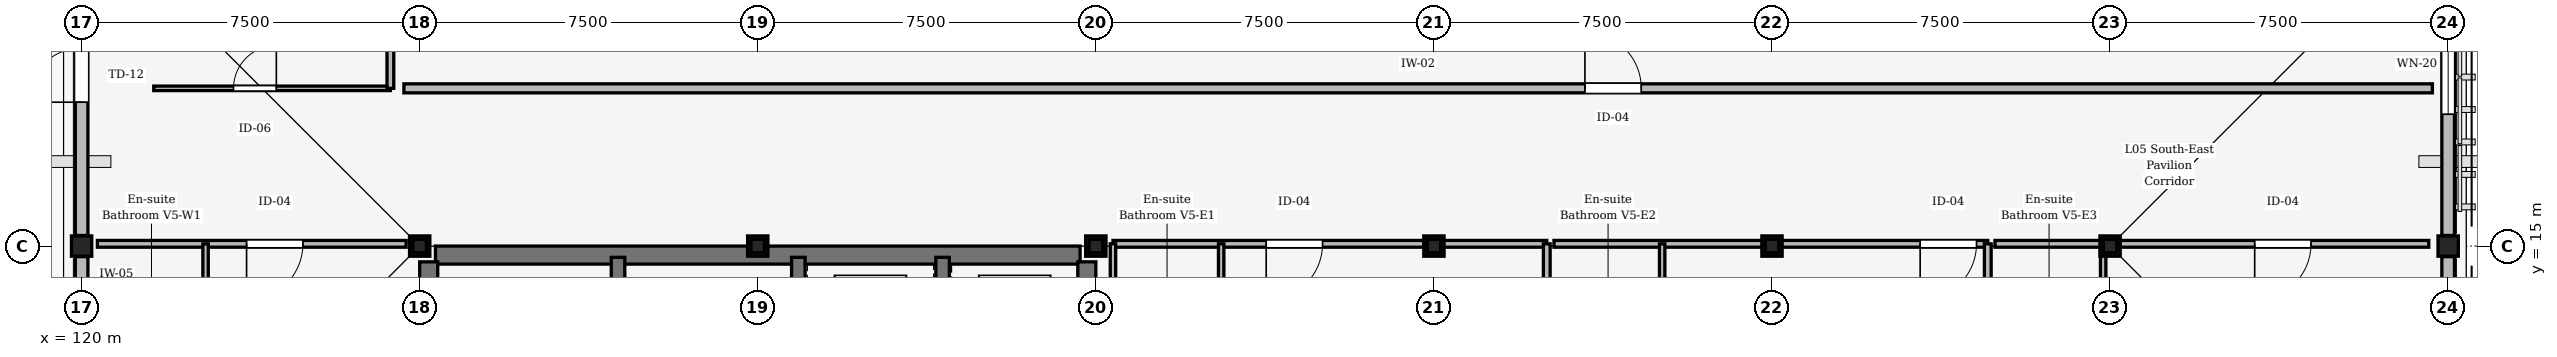
"""IFC4 building model, lengths in metres.
Left out: names, types, materials, properties, quantities, classifications, styles, units other than length and angle.
Written with IfcOpenShell. Run it as: python <this file> out.ifc"""

import sys

from ifc_helpers import new_model, si_unit, direction, frame, frame_2d, origin, origin_2d, place, context, subcontext, project, spatial, rectangle, i_section, extrude, element, fill, save


model = new_model("IFC4")
c1 = context("Model", 3, precision=1e-05, world=origin(), true_north=direction((0.0, 1.0)))
c2 = subcontext(c1, "Body", "Model", "MODEL_VIEW")
j1 = project(units=[si_unit("LENGTHUNIT", "METRE"), si_unit("PLANEANGLEUNIT", "RADIAN")], contexts=[c1])
p1 = place(None, origin())
s1 = spatial("IfcSite", under=j1, at=p1, CompositionType="ELEMENT")
p2 = place(p1, origin())
s2 = spatial("IfcBuilding", under=s1, at=p2, CompositionType="ELEMENT")
p3 = place(p2, frame((0.0, 0.0, 21.9)))
s3 = spatial("IfcBuildingStorey", under=s2, at=p3, CompositionType="ELEMENT", Elevation=21.9)
for number, where, z_axis, x_axis in (
    (1, (120.0, 15.0, 0.0), (0.0, 0.0, 1.0), (1.0, 0.0, 0.0)),
    (2, (127.5, 15.0, 0.0), (0.0, 0.0, 1.0), (1.0, 0.0, 0.0)),
    (3, (135.0, 15.0, 0.0), (0.0, 0.0, 1.0), (1.0, 0.0, 0.0)),
    (4, (142.5, 15.0, 0.0), (0.0, 0.0, 1.0), (1.0, 0.0, 0.0)),
    (5, (150.0, 15.0, 0.0), (0.0, 0.0, 1.0), (1.0, 0.0, 0.0)),
    (6, (157.5, 15.0, 0.0), (0.0, 0.0, 1.0), (1.0, 0.0, 0.0)),
    (7, (165.0, 15.0, 0.0), (0.0, 0.0, 1.0), (1.0, 0.0, 0.0)),
    (8, (172.5, 15.0, 0.0), (0.0, 0.0, 1.0), (1.0, 0.0, 0.0)),
):
    element("IfcColumn", number, at=place(p3, frame(where, z_axis=z_axis, x_axis=x_axis)), inside=s3, PredefinedType="COLUMN", context=c2, shape_type="SweptSolid", body=[
        extrude(rectangle(XDim=0.45, YDim=0.45, at=origin_2d()), origin(), (0.0, 0.0, 1.0), 4.05),
    ])
for number, where, z_axis, x_axis in (
    (9, (127.5, 15.0, 4.05), (0.0, 0.0, 1.0), (1.0, 0.0, 0.0)),
    (10, (135.0, 15.0, 4.05), (0.0, 0.0, 1.0), (1.0, 0.0, 0.0)),
    (11, (142.5, 15.0, 4.05), (0.0, 0.0, 1.0), (1.0, 0.0, 0.0)),
    (12, (150.0, 15.0, 4.05), (0.0, 0.0, 1.0), (1.0, 0.0, 0.0)),
    (13, (157.5, 15.0, 4.05), (0.0, 0.0, 1.0), (1.0, 0.0, 0.0)),
    (14, (165.0, 15.0, 4.05), (0.0, 0.0, 1.0), (1.0, 0.0, 0.0)),
):
    element("IfcColumn", number, at=place(p3, frame(where, z_axis=z_axis, x_axis=x_axis)), inside=s3, PredefinedType="COLUMN", context=c2, shape_type="SweptSolid", body=[
        extrude(i_section(OverallWidth=0.3, OverallDepth=0.3, WebThickness=0.011, FlangeThickness=0.019, FilletRadius=0.027, at=origin_2d()), origin(), (0.0, 0.0, 1.0), 1.97),
    ])
p4 = place(p3, frame((120.0, 7.735, 0.0), z_axis=(0.0, 0.0, 1.0), x_axis=(0.0, 1.0, 0.0)))
e15 = element("IfcWall", 15, at=p4, inside=s3, PredefinedType="STANDARD", context=c2, shape_type="SweptSolid", body=[
    extrude(rectangle(XDim=7.03, YDim=0.28, at=frame_2d((3.515, 0.0))), origin(), (0.0, 0.0, 1.0), 3.77),
])
p5 = place(p4, frame((2.915, 0.0, 0.0)))
e16 = element("IfcOpeningElement", 16, at=p5, cuts=e15, PredefinedType="OPENING", context=c2, shape_type="SweptSolid", body=[
    extrude(rectangle(XDim=1.2, YDim=2.3, at=frame_2d((0.6, 1.15))), frame((0.0, 0.15, 0.0), z_axis=(0.0, -1.0, 0.0), x_axis=(1.0, 0.0, 0.0)), (0.0, 0.0, 1.0), 0.3),
])
p6 = place(p3, frame((120.0, 15.235, 0.0), z_axis=(0.0, 0.0, 1.0), x_axis=(0.0, 1.0, 0.0)))
e17 = element("IfcWall", 17, at=p6, inside=s3, PredefinedType="STANDARD", context=c2, shape_type="SweptSolid", body=[
    extrude(rectangle(XDim=7.115, YDim=0.28, at=frame_2d((3.558, 0.0))), origin(), (0.0, 0.0, 1.0), 3.77),
])
p7 = place(p6, frame((2.958, 0.0, 0.0)))
e18 = element("IfcOpeningElement", 18, at=p7, cuts=e17, PredefinedType="OPENING", context=c2, shape_type="SweptSolid", body=[
    extrude(rectangle(XDim=1.2, YDim=2.3, at=frame_2d((0.6, 1.15))), frame((0.0, 0.15, 0.0), z_axis=(0.0, -1.0, 0.0), x_axis=(1.0, 0.0, 0.0)), (0.0, 0.0, 1.0), 0.3),
])
p8 = place(p3, frame((172.5, 14.765, 0.0), z_axis=(0.0, 0.0, 1.0), x_axis=(0.0, -1.0, 0.0)))
e19 = element("IfcWall", 19, at=p8, inside=s3, PredefinedType="STANDARD", context=c2, shape_type="SweptSolid", body=[
    extrude(rectangle(XDim=7.03, YDim=0.28, at=frame_2d((3.515, 0.0))), origin(), (0.0, 0.0, 1.0), 3.77),
])
p9 = place(p8, frame((2.84, 0.0, 0.85)))
e20 = element("IfcOpeningElement", 20, at=p9, cuts=e19, PredefinedType="OPENING", context=c2, shape_type="SweptSolid", body=[
    extrude(rectangle(XDim=1.35, YDim=2.25, at=frame_2d((0.675, 1.125))), frame((0.0, 0.15, 0.0), z_axis=(0.0, -1.0, 0.0), x_axis=(1.0, 0.0, 0.0)), (0.0, 0.0, 1.0), 0.3),
])
p10 = place(p3, frame((172.5, 22.265, 0.0), z_axis=(0.0, 0.0, 1.0), x_axis=(0.0, -1.0, 0.0)))
e21 = element("IfcWall", 21, at=p10, inside=s3, PredefinedType="STANDARD", context=c2, shape_type="SweptSolid", body=[
    extrude(rectangle(XDim=7.03, YDim=0.28, at=frame_2d((3.515, 0.0))), origin(), (0.0, 0.0, 1.0), 3.77),
])
p11 = place(p10, frame((2.69, 0.0, 0.85)))
e22 = element("IfcOpeningElement", 22, at=p11, cuts=e21, PredefinedType="OPENING", context=c2, shape_type="SweptSolid", body=[
    extrude(rectangle(XDim=1.65, YDim=2.25, at=frame_2d((0.825, 1.125))), frame((0.0, 0.15, 0.0), z_axis=(0.0, -1.0, 0.0), x_axis=(1.0, 0.0, 0.0)), (0.0, 0.0, 1.0), 0.3),
])
p12 = place(p3, frame((127.85, 14.8, 0.0), z_axis=(0.0, 0.0, 1.0), x_axis=(1.0, 0.0, 0.0)))
e23 = element("IfcWall", 23, at=p12, inside=s3, PredefinedType="SHEAR", context=c2, shape_type="SweptSolid", body=[
    extrude(rectangle(XDim=14.3, YDim=0.4, at=frame_2d((7.15, 0.0))), origin(), (0.0, 0.0, 1.0), 3.77),
])
p13 = place(p3, frame((127.7, 7.85, 0.0), z_axis=(0.0, 0.0, 1.0), x_axis=(0.0, 1.0, 0.0)))
e24 = element("IfcWall", 24, at=p13, inside=s3, PredefinedType="SHEAR", context=c2, shape_type="SweptSolid", body=[
    extrude(rectangle(XDim=6.8, YDim=0.4, at=frame_2d((3.4, 0.0))), origin(), (0.0, 0.0, 1.0), 3.77),
])
p14 = place(p3, frame((142.3, 11.6, 0.0), z_axis=(0.0, 0.0, 1.0), x_axis=(0.0, 1.0, 0.0)))
e25 = element("IfcWall", 25, at=p14, inside=s3, PredefinedType="SHEAR", context=c2, shape_type="SweptSolid", body=[
    extrude(rectangle(XDim=3.05, YDim=0.4, at=frame_2d((1.525, 0.0))), origin(), (0.0, 0.0, 1.0), 3.77),
])
for number, where, z_axis, x_axis in (
    (26, (131.9, 11.6, 0.0), (0.0, 0.0, 1.0), (0.0, 1.0, 0.0)),
    (27, (135.9, 11.6, 0.0), (0.0, 0.0, 1.0), (0.0, 1.0, 0.0)),
    (28, (139.1, 11.6, 0.0), (0.0, 0.0, 1.0), (0.0, 1.0, 0.0)),
):
    element("IfcWall", number, at=place(p3, frame(where, z_axis=z_axis, x_axis=x_axis)), inside=s3, PredefinedType="SHEAR", context=c2, shape_type="SweptSolid", body=[
        extrude(rectangle(XDim=3.15, YDim=0.3, at=frame_2d((1.575, 0.0))), origin(), (0.0, 0.0, 1.0), 3.77),
    ])
p15 = place(p3, frame((127.2, 15.05, 0.0), z_axis=(0.0, 0.0, 1.0), x_axis=(-1.0, 0.0, 0.0)))
e29 = element("IfcWall", 29, at=p15, inside=s3, PredefinedType="PARTITIONING", context=c2, shape_type="SweptSolid", body=[
    extrude(rectangle(XDim=6.85, YDim=0.15, at=frame_2d((3.425, 0.0))), origin(), (0.0, 0.0, 1.0), 3.755),
])
p16 = place(p15, frame((2.29, 0.0, 0.0)))
e30 = element("IfcOpeningElement", 30, at=p16, cuts=e29, PredefinedType="OPENING", context=c2, shape_type="SweptSolid", body=[
    extrude(rectangle(XDim=1.25, YDim=2.2, at=frame_2d((0.625, 1.1))), frame((0.0, 0.085, 0.0), z_axis=(0.0, -1.0, 0.0), x_axis=(1.0, 0.0, 0.0)), (0.0, 0.0, 1.0), 0.17),
])
p17 = place(p3, frame((122.75, 13.05, 0.0), z_axis=(0.0, 0.0, 1.0), x_axis=(0.0, 1.0, 0.0)))
e31 = element("IfcWall", 31, at=p17, inside=s3, PredefinedType="PARTITIONING", context=c2, shape_type="SweptSolid", body=[
    extrude(rectangle(XDim=2.0, YDim=0.12, at=frame_2d((1.0, 0.0))), origin(), (0.0, 0.0, 1.0), 3.755),
])
p18 = place(p3, frame((152.503, 15.05, 0.0), z_axis=(0.0, 0.0, 1.0), x_axis=(-1.0, 0.0, 0.0)))
e32 = element("IfcWall", 32, at=p18, inside=s3, PredefinedType="PARTITIONING", context=c2, shape_type="SweptSolid", body=[
    extrude(rectangle(XDim=9.624, YDim=0.15, at=frame_2d((4.812, 0.0))), origin(), (0.0, 0.0, 1.0), 3.755),
])
p19 = place(p18, frame((4.974, 0.0, 0.0)))
e33 = element("IfcOpeningElement", 33, at=p19, cuts=e32, PredefinedType="OPENING", context=c2, shape_type="SweptSolid", body=[
    extrude(rectangle(XDim=1.25, YDim=2.2, at=frame_2d((0.625, 1.1))), frame((0.0, 0.085, 0.0), z_axis=(0.0, -1.0, 0.0), x_axis=(1.0, 0.0, 0.0)), (0.0, 0.0, 1.0), 0.17),
])
p20 = place(p3, frame((145.28, 13.05, 0.0), z_axis=(0.0, 0.0, 1.0), x_axis=(0.0, 1.0, 0.0)))
e34 = element("IfcWall", 34, at=p20, inside=s3, PredefinedType="PARTITIONING", context=c2, shape_type="SweptSolid", body=[
    extrude(rectangle(XDim=2.0, YDim=0.12, at=frame_2d((1.0, 0.0))), origin(), (0.0, 0.0, 1.0), 3.755),
])
p21 = place(p3, frame((162.287, 15.05, 0.0), z_axis=(0.0, 0.0, 1.0), x_axis=(-1.0, 0.0, 0.0)))
e35 = element("IfcWall", 35, at=p21, inside=s3, PredefinedType="PARTITIONING", context=c2, shape_type="SweptSolid", body=[
    extrude(rectangle(XDim=9.623, YDim=0.15, at=frame_2d((4.812, 0.0))), origin(), (0.0, 0.0, 1.0), 3.755),
])
p22 = place(p21, frame((0.25, 0.0, 0.0)))
e36 = element("IfcOpeningElement", 36, at=p22, cuts=e35, PredefinedType="OPENING", context=c2, shape_type="SweptSolid", body=[
    extrude(rectangle(XDim=1.25, YDim=2.2, at=frame_2d((0.625, 1.1))), frame((0.0, 0.085, 0.0), z_axis=(0.0, -1.0, 0.0), x_axis=(1.0, 0.0, 0.0)), (0.0, 0.0, 1.0), 0.17),
])
p23 = place(p3, frame((155.063, 13.05, 0.0), z_axis=(0.0, 0.0, 1.0), x_axis=(0.0, 1.0, 0.0)))
e37 = element("IfcWall", 37, at=p23, inside=s3, PredefinedType="PARTITIONING", context=c2, shape_type="SweptSolid", body=[
    extrude(rectangle(XDim=2.0, YDim=0.12, at=frame_2d((1.0, 0.0))), origin(), (0.0, 0.0, 1.0), 3.755),
])
p24 = place(p3, frame((172.07, 15.05, 0.0), z_axis=(0.0, 0.0, 1.0), x_axis=(-1.0, 0.0, 0.0)))
e38 = element("IfcWall", 38, at=p24, inside=s3, PredefinedType="PARTITIONING", context=c2, shape_type="SweptSolid", body=[
    extrude(rectangle(XDim=9.623, YDim=0.15, at=frame_2d((4.812, 0.0))), origin(), (0.0, 0.0, 1.0), 3.755),
])
p25 = place(p24, frame((2.612, 0.0, 0.0)))
e39 = element("IfcOpeningElement", 39, at=p25, cuts=e38, PredefinedType="OPENING", context=c2, shape_type="SweptSolid", body=[
    extrude(rectangle(XDim=1.25, YDim=2.2, at=frame_2d((0.625, 1.1))), frame((0.0, 0.085, 0.0), z_axis=(0.0, -1.0, 0.0), x_axis=(1.0, 0.0, 0.0)), (0.0, 0.0, 1.0), 0.17),
])
p26 = place(p3, frame((164.847, 13.05, 0.0), z_axis=(0.0, 0.0, 1.0), x_axis=(0.0, 1.0, 0.0)))
e40 = element("IfcWall", 40, at=p26, inside=s3, PredefinedType="PARTITIONING", context=c2, shape_type="SweptSolid", body=[
    extrude(rectangle(XDim=2.0, YDim=0.12, at=frame_2d((1.0, 0.0))), origin(), (0.0, 0.0, 1.0), 3.755),
])
p27 = place(p3, frame((121.6, 18.5, 0.0), z_axis=(0.0, 0.0, 1.0), x_axis=(1.0, 0.0, 0.0)))
e41 = element("IfcWall", 41, at=p27, inside=s3, PredefinedType="PARTITIONING", context=c2, shape_type="SweptSolid", body=[
    extrude(rectangle(XDim=5.25, YDim=0.1, at=frame_2d((2.625, 0.0))), origin(), (0.0, 0.0, 1.0), 3.755),
])
p28 = place(p27, frame((1.77, 0.0, 0.0)))
e42 = element("IfcOpeningElement", 42, at=p28, cuts=e41, PredefinedType="OPENING", context=c2, shape_type="SweptSolid", body=[
    extrude(rectangle(XDim=0.95, YDim=2.15, at=frame_2d((0.475, 1.075))), frame((0.0, 0.06, 0.0), z_axis=(0.0, -1.0, 0.0), x_axis=(1.0, 0.0, 0.0)), (0.0, 0.0, 1.0), 0.12),
])
p29 = place(p3, frame((127.15, 18.5, 0.0), z_axis=(0.0, 0.0, 1.0), x_axis=(1.0, 0.0, 0.0)))
e43 = element("IfcWall", 43, at=p29, inside=s3, PredefinedType="STANDARD", context=c2, shape_type="SweptSolid", body=[
    extrude(rectangle(XDim=45.0, YDim=0.2, at=frame_2d((22.5, 0.0))), origin(), (0.0, 0.0, 1.0), 3.755),
])
p30 = place(p29, frame((26.2, 0.0, 0.0)))
e44 = element("IfcOpeningElement", 44, at=p30, cuts=e43, PredefinedType="OPENING", context=c2, shape_type="SweptSolid", body=[
    extrude(rectangle(XDim=1.25, YDim=2.2, at=frame_2d((0.625, 1.1))), frame((0.0, 0.11, 0.0), z_axis=(0.0, -1.0, 0.0), x_axis=(1.0, 0.0, 0.0)), (0.0, 0.0, 1.0), 0.22),
])
for number, where, z_axis, x_axis in (
    (45, (152.503, 7.85, 0.0), (0.0, 0.0, 1.0), (0.0, 1.0, 0.0)),
    (46, (162.287, 7.85, 0.0), (0.0, 0.0, 1.0), (0.0, 1.0, 0.0)),
):
    element("IfcWall", number, at=place(p3, frame(where, z_axis=z_axis, x_axis=x_axis)), inside=s3, PredefinedType="PARTITIONING", context=c2, shape_type="SweptSolid", body=[
        extrude(rectangle(XDim=7.2, YDim=0.15, at=frame_2d((3.6, 0.0))), origin(), (0.0, 0.0, 1.0), 3.755),
    ])
p31 = place(p3, frame((126.85, 18.5, 0.0), z_axis=(0.0, 0.0, 1.0), x_axis=(0.0, 1.0, 0.0)))
e47 = element("IfcWall", 47, at=p31, inside=s3, PredefinedType="PARTITIONING", context=c2, shape_type="SweptSolid", body=[
    extrude(rectangle(XDim=3.65, YDim=0.15, at=frame_2d((1.825, 0.0))), origin(), (0.0, 0.0, 1.0), 3.755),
])
p32 = place(p3, frame((142.88, 13.05, 0.0), z_axis=(0.0, 0.0, 1.0), x_axis=(0.0, 1.0, 0.0)))
e48 = element("IfcWall", 48, at=p32, inside=s3, PredefinedType="PARTITIONING", context=c2, shape_type="SweptSolid", body=[
    extrude(rectangle(XDim=2.0, YDim=0.12, at=frame_2d((1.0, 0.0))), origin(), (0.0, 0.0, 1.0), 3.755),
])
p33 = place(p7, origin())
e49 = element("IfcDoor", 49, at=p33, inside=s3, OperationType="SINGLE_SWING_LEFT", PredefinedType="DOOR", context=c2, shape_type="SweptSolid", body=[
    extrude(rectangle(XDim=1.2, YDim=2.3, at=frame_2d((0.6, 1.15))), frame((0.0, 0.025, 0.0), z_axis=(0.0, -1.0, 0.0), x_axis=(1.0, 0.0, 0.0)), (0.0, 0.0, 1.0), 0.05),
])
fill(e18, e49)
p34 = place(p11, origin())
e50 = element("IfcWindow", 50, at=p34, inside=s3, PartitioningType="SINGLE_PANEL", PredefinedType="WINDOW", context=c2, shape_type="SweptSolid", body=[
    extrude(rectangle(XDim=1.65, YDim=2.25, at=frame_2d((0.825, 1.125))), frame((0.0, 0.03, 0.0), z_axis=(0.0, -1.0, 0.0), x_axis=(1.0, 0.0, 0.0)), (0.0, 0.0, 1.0), 0.06),
])
fill(e22, e50)
p35 = place(p16, origin())
e51 = element("IfcDoor", 51, at=p35, inside=s3, OperationType="SINGLE_SWING_RIGHT", PredefinedType="DOOR", context=c2, shape_type="SweptSolid", body=[
    extrude(rectangle(XDim=1.25, YDim=2.2, at=frame_2d((0.625, 1.1))), frame((0.0, 0.025, 0.0), z_axis=(0.0, -1.0, 0.0), x_axis=(1.0, 0.0, 0.0)), (0.0, 0.0, 1.0), 0.05),
])
fill(e30, e51)
p36 = place(p19, origin())
e52 = element("IfcDoor", 52, at=p36, inside=s3, OperationType="SINGLE_SWING_RIGHT", PredefinedType="DOOR", context=c2, shape_type="SweptSolid", body=[
    extrude(rectangle(XDim=1.25, YDim=2.2, at=frame_2d((0.625, 1.1))), frame((0.0, 0.025, 0.0), z_axis=(0.0, -1.0, 0.0), x_axis=(1.0, 0.0, 0.0)), (0.0, 0.0, 1.0), 0.05),
])
fill(e33, e52)
p37 = place(p22, origin())
e53 = element("IfcDoor", 53, at=p37, inside=s3, OperationType="SINGLE_SWING_RIGHT", PredefinedType="DOOR", context=c2, shape_type="SweptSolid", body=[
    extrude(rectangle(XDim=1.25, YDim=2.2, at=frame_2d((0.625, 1.1))), frame((0.0, 0.025, 0.0), z_axis=(0.0, -1.0, 0.0), x_axis=(1.0, 0.0, 0.0)), (0.0, 0.0, 1.0), 0.05),
])
fill(e36, e53)
p38 = place(p25, origin())
e54 = element("IfcDoor", 54, at=p38, inside=s3, OperationType="SINGLE_SWING_RIGHT", PredefinedType="DOOR", context=c2, shape_type="SweptSolid", body=[
    extrude(rectangle(XDim=1.25, YDim=2.2, at=frame_2d((0.625, 1.1))), frame((0.0, 0.025, 0.0), z_axis=(0.0, -1.0, 0.0), x_axis=(1.0, 0.0, 0.0)), (0.0, 0.0, 1.0), 0.05),
])
fill(e39, e54)
p39 = place(p28, origin())
e55 = element("IfcDoor", 55, at=p39, inside=s3, OperationType="SINGLE_SWING_RIGHT", PredefinedType="DOOR", context=c2, shape_type="SweptSolid", body=[
    extrude(rectangle(XDim=0.95, YDim=2.15, at=frame_2d((0.475, 1.075))), frame((0.0, 0.025, 0.0), z_axis=(0.0, -1.0, 0.0), x_axis=(1.0, 0.0, 0.0)), (0.0, 0.0, 1.0), 0.05),
])
fill(e42, e55)
p40 = place(p30, origin())
e56 = element("IfcDoor", 56, at=p40, inside=s3, OperationType="SINGLE_SWING_LEFT", PredefinedType="DOOR", context=c2, shape_type="SweptSolid", body=[
    extrude(rectangle(XDim=1.25, YDim=2.2, at=frame_2d((0.625, 1.1))), frame((0.0, 0.025, 0.0), z_axis=(0.0, -1.0, 0.0), x_axis=(1.0, 0.0, 0.0)), (0.0, 0.0, 1.0), 0.05),
])
fill(e44, e56)
save(model, sys.argv[1])
